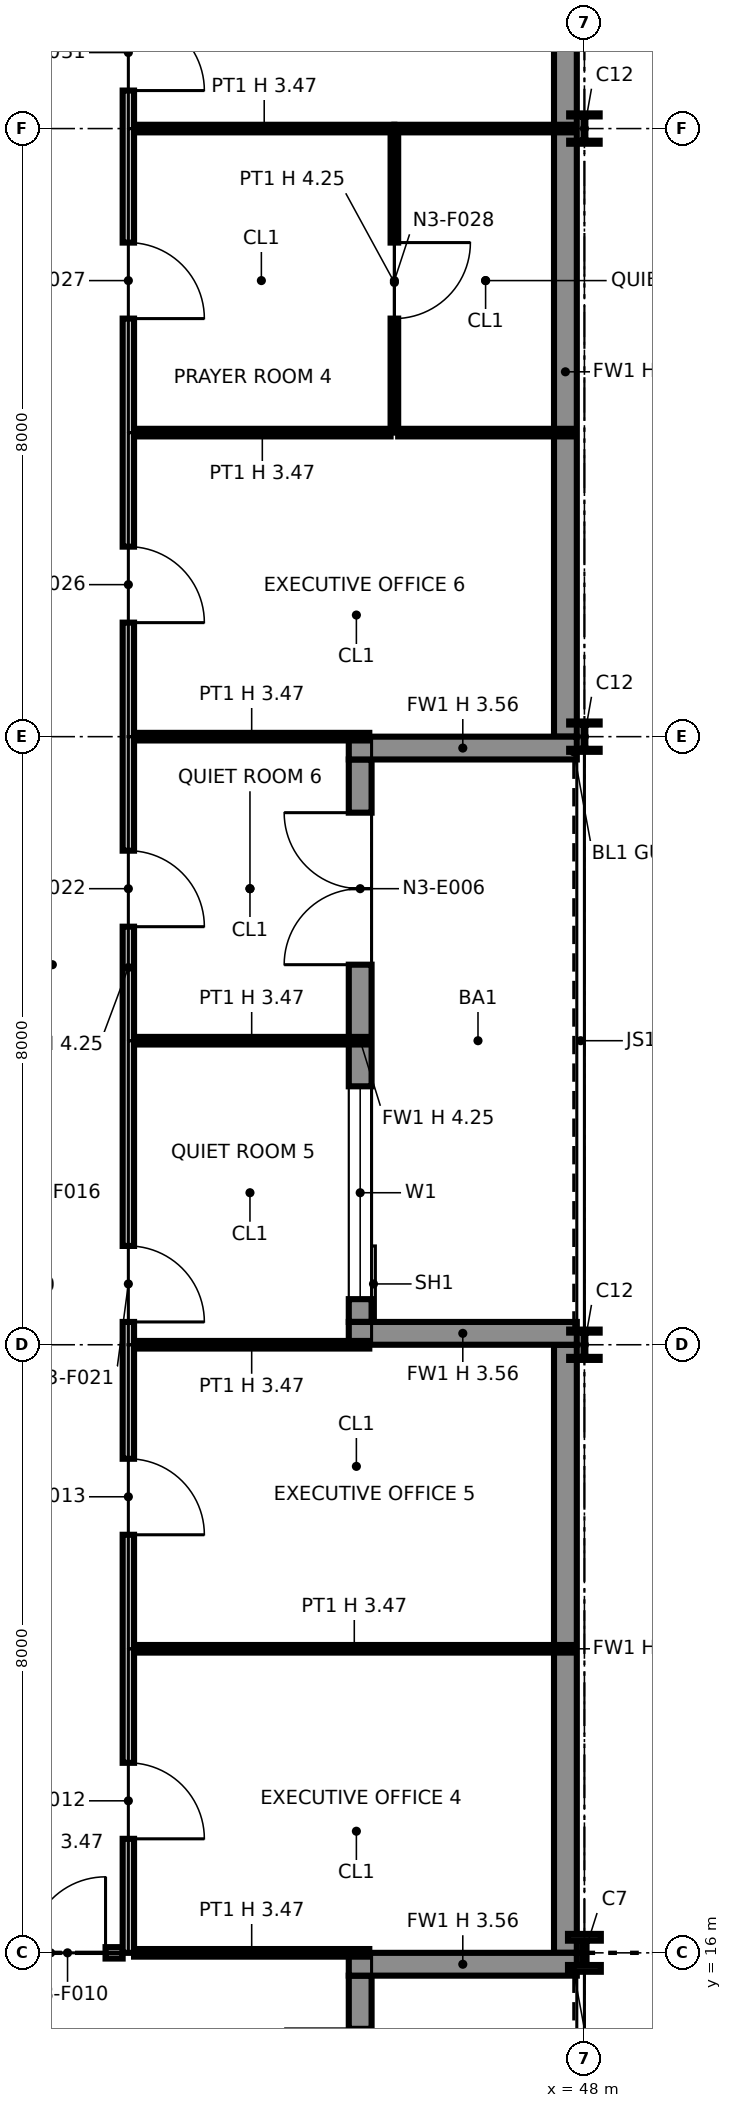
"""IFC4 building model, lengths in metres.
Left out: names, types, materials, properties, quantities, classifications, styles, units other than length and angle.
Written with IfcOpenShell. Run it as: python <this file> out.ifc"""

import sys

from ifc_helpers import new_model, si_unit, direction, frame, frame_2d, origin, origin_2d, place, context, subcontext, project, spatial, polyline, rectangle, i_section, outline, extrude, element, fill, save


model = new_model("IFC4")
c1 = context("Model", 3, precision=1e-05, world=origin(), true_north=direction((0.0, 1.0)))
c2 = subcontext(c1, "Body", "Model", "MODEL_VIEW")
j1 = project(units=[si_unit("LENGTHUNIT", "METRE"), si_unit("PLANEANGLEUNIT", "RADIAN")], contexts=[c1])
p1 = place(None, origin())
s1 = spatial("IfcSite", under=j1, at=p1, CompositionType="ELEMENT")
p2 = place(p1, origin())
s2 = spatial("IfcBuilding", under=s1, at=p2, CompositionType="ELEMENT")
p3 = place(p2, frame((0.0, 0.0, 65.6)))
s3 = spatial("IfcBuildingStorey", under=s2, at=p3, CompositionType="ELEMENT", Elevation=65.6)
p4 = place(p3, frame((48.0, 16.0, 0.0), z_axis=(0.0, 0.0, 1.0), x_axis=(1.0, 0.0, 0.0)))
e1 = element("IfcColumn", 1, at=p4, inside=s3, PredefinedType="COLUMN", context=c2, shape_type="SweptSolid", body=[
    extrude(i_section(OverallWidth=0.432, OverallDepth=0.498, WebThickness=0.056, FlangeThickness=0.089, at=origin_2d()), origin(), (0.0, 0.0, 1.0), 4.25),
])
for number, where, z_axis, x_axis in (
    (2, (48.0, 24.0, 0.0), (0.0, 0.0, 1.0), (1.0, 0.0, 0.0)),
    (3, (48.0, 32.0, 0.0), (0.0, 0.0, 1.0), (1.0, 0.0, 0.0)),
    (4, (48.0, 40.0, 0.0), (0.0, 0.0, 1.0), (1.0, 0.0, 0.0)),
):
    element("IfcColumn", number, at=place(p3, frame(where, z_axis=z_axis, x_axis=x_axis)), inside=s3, PredefinedType="COLUMN", context=c2, shape_type="SweptSolid", body=[
        extrude(i_section(OverallWidth=0.401, OverallDepth=0.399, WebThickness=0.025, FlangeThickness=0.04, at=origin_2d()), origin(), (0.0, 0.0, 1.0), 4.25),
    ])
p5 = place(p3, frame((45.05, 8.3, 0.0), z_axis=(0.0, 0.0, 1.0), x_axis=(0.0, 1.0, 0.0)))
e5 = element("IfcWall", 5, at=p5, inside=s3, PredefinedType="SOLIDWALL", context=c2, shape_type="SweptSolid", body=[
    extrude(rectangle(XDim=7.4, YDim=0.3, at=frame_2d((3.7, 0.0))), origin(), (0.0, 0.0, 1.0), 4.25),
])
p6 = place(p5, frame((0.3, 0.0, 0.9)))
e6 = element("IfcOpeningElement", 6, at=p6, cuts=e5, PredefinedType="OPENING", context=c2, shape_type="SweptSolid", body=[
    extrude(rectangle(XDim=2.8, YDim=2.2, at=frame_2d((1.4, 1.1))), frame((0.0, 0.16, 0.0), z_axis=(0.0, -1.0, 0.0), x_axis=(1.0, 0.0, 0.0)), (0.0, 0.0, 1.0), 0.32),
])
p7 = place(p5, frame((4.7, 0.0, 0.0)))
e7 = element("IfcOpeningElement", 7, at=p7, cuts=e5, PredefinedType="OPENING", context=c2, shape_type="SweptSolid", body=[
    extrude(rectangle(XDim=2.0, YDim=2.4, at=frame_2d((1.0, 1.2))), frame((0.0, 0.16, 0.0), z_axis=(0.0, -1.0, 0.0), x_axis=(1.0, 0.0, 0.0)), (0.0, 0.0, 1.0), 0.32),
])
p8 = place(p3, frame((47.9, 15.85, 0.0), z_axis=(0.0, 0.0, 1.0), x_axis=(-1.0, 0.0, 0.0)))
e8 = element("IfcWall", 8, at=p8, inside=s3, PredefinedType="SOLIDWALL", context=c2, shape_type="SweptSolid", body=[
    extrude(rectangle(XDim=3.0, YDim=0.3, at=frame_2d((1.5, 0.0))), origin(), (0.0, 0.0, 1.0), 3.556),
])
p9 = place(p3, frame((47.75, 16.0, 0.0), z_axis=(0.0, 0.0, 1.0), x_axis=(0.0, 1.0, 0.0)))
e9 = element("IfcWall", 9, at=p9, inside=s3, PredefinedType="SOLIDWALL", context=c2, shape_type="SweptSolid", body=[
    extrude(rectangle(XDim=8.0, YDim=0.3, at=frame_2d((4.0, 0.0))), origin(), (0.0, 0.0, 1.0), 4.25),
])
p10 = place(p3, frame((45.05, 24.3, 0.0), z_axis=(0.0, 0.0, 1.0), x_axis=(0.0, 1.0, 0.0)))
e10 = element("IfcWall", 10, at=p10, inside=s3, PredefinedType="SOLIDWALL", context=c2, shape_type="SweptSolid", body=[
    extrude(rectangle(XDim=7.4, YDim=0.3, at=frame_2d((3.7, 0.0))), origin(), (0.0, 0.0, 1.0), 4.25),
])
p11 = place(p10, frame((0.3, 0.0, 0.9)))
e11 = element("IfcOpeningElement", 11, at=p11, cuts=e10, PredefinedType="OPENING", context=c2, shape_type="SweptSolid", body=[
    extrude(rectangle(XDim=2.8, YDim=2.2, at=frame_2d((1.4, 1.1))), frame((0.0, 0.16, 0.0), z_axis=(0.0, -1.0, 0.0), x_axis=(1.0, 0.0, 0.0)), (0.0, 0.0, 1.0), 0.32),
])
p12 = place(p10, frame((4.7, 0.0, 0.0)))
e12 = element("IfcOpeningElement", 12, at=p12, cuts=e10, PredefinedType="OPENING", context=c2, shape_type="SweptSolid", body=[
    extrude(rectangle(XDim=2.0, YDim=2.4, at=frame_2d((1.0, 1.2))), frame((0.0, 0.16, 0.0), z_axis=(0.0, -1.0, 0.0), x_axis=(1.0, 0.0, 0.0)), (0.0, 0.0, 1.0), 0.32),
])
for number, where, z_axis, x_axis in (
    (13, (47.9, 24.15, 0.0), (0.0, 0.0, 1.0), (-1.0, 0.0, 0.0)),
    (14, (47.9, 31.85, 0.0), (0.0, 0.0, 1.0), (-1.0, 0.0, 0.0)),
):
    element("IfcWall", number, at=place(p3, frame(where, z_axis=z_axis, x_axis=x_axis)), inside=s3, PredefinedType="SOLIDWALL", context=c2, shape_type="SweptSolid", body=[
        extrude(rectangle(XDim=3.0, YDim=0.3, at=frame_2d((1.5, 0.0))), origin(), (0.0, 0.0, 1.0), 3.556),
    ])
p13 = place(p3, frame((47.75, 32.0, 0.0), z_axis=(0.0, 0.0, 1.0), x_axis=(0.0, 1.0, 0.0)))
e15 = element("IfcWall", 15, at=p13, inside=s3, PredefinedType="SOLIDWALL", context=c2, shape_type="SweptSolid", body=[
    extrude(rectangle(XDim=9.6, YDim=0.3, at=frame_2d((4.8, 0.0))), origin(), (0.0, 0.0, 1.0), 4.25),
])
p14 = place(p3, frame((40.03, 16.0, 0.0), z_axis=(0.0, 0.0, 1.0), x_axis=(1.0, 0.0, 0.0)))
e16 = element("IfcWall", 16, at=p14, inside=s3, PredefinedType="PARTITIONING", context=c2, shape_type="SweptSolid", body=[
    extrude(rectangle(XDim=1.895, YDim=0.15, at=frame_2d((0.948, 0.0))), origin(), (0.0, 0.0, 1.0), 3.47),
])
p15 = place(p14, frame((0.67, 0.0, 0.0)))
e17 = element("IfcOpeningElement", 17, at=p15, cuts=e16, PredefinedType="OPENING", context=c2, shape_type="SweptSolid", body=[
    extrude(rectangle(XDim=1.0, YDim=2.1, at=frame_2d((0.5, 1.05))), frame((0.0, 0.085, 0.0), z_axis=(0.0, -1.0, 0.0), x_axis=(1.0, 0.0, 0.0)), (0.0, 0.0, 1.0), 0.17),
])
p16 = place(p3, frame((42.075, 16.0, 0.0), z_axis=(0.0, 0.0, 1.0), x_axis=(1.0, 0.0, 0.0)))
e18 = element("IfcWall", 18, at=p16, inside=s3, PredefinedType="PARTITIONING", context=c2, shape_type="SweptSolid", body=[
    extrude(rectangle(XDim=3.095, YDim=0.1, at=frame_2d((1.547, 0.0))), origin(), (0.0, 0.0, 1.0), 3.47),
])
p17 = place(p3, frame((42.0, 16.0, 0.0), z_axis=(0.0, 0.0, 1.0), x_axis=(0.0, 1.0, 0.0)))
e19 = element("IfcWall", 19, at=p17, inside=s3, PredefinedType="PARTITIONING", context=c2, shape_type="SweptSolid", body=[
    extrude(outline(polyline([(0.0, 0.0), (25.925, 0.0), (25.925, 4.25), (24.3, 4.25), (24.298, 3.47), (23.702, 3.47), (23.7, 4.25), (20.3, 4.25), (20.298, 3.47), (19.702, 3.47), (19.7, 4.25), (16.3, 4.25), (16.298, 3.47), (15.702, 3.47), (15.7, 4.25), (12.3, 4.25), (12.298, 3.47), (11.702, 3.47), (11.7, 4.25), (8.3, 4.25), (8.298, 3.47), (7.702, 3.47), (7.7, 4.25), (4.3, 4.25), (4.298, 3.47), (3.702, 3.47), (3.7, 4.25), (0.0, 4.25), (0.0, 0.0)])), frame((0.0, 0.075, 0.0), z_axis=(0.0, -1.0, 0.0), x_axis=(1.0, 0.0, 0.0)), (0.0, 0.0, 1.0), 0.15),
])
p18 = place(p17, frame((2.5, 0.0, 0.0), z_axis=(0.0, 0.0, 1.0), x_axis=(-1.0, 0.0, 0.0)))
e20 = element("IfcOpeningElement", 20, at=p18, cuts=e19, PredefinedType="OPENING", context=c2, shape_type="SweptSolid", body=[
    extrude(rectangle(XDim=1.0, YDim=2.1, at=frame_2d((0.5, 1.05))), frame((0.0, 0.085, 0.0), z_axis=(0.0, -1.0, 0.0), x_axis=(1.0, 0.0, 0.0)), (0.0, 0.0, 1.0), 0.17),
])
p19 = place(p17, frame((6.5, 0.0, 0.0), z_axis=(0.0, 0.0, 1.0), x_axis=(-1.0, 0.0, 0.0)))
e21 = element("IfcOpeningElement", 21, at=p19, cuts=e19, PredefinedType="OPENING", context=c2, shape_type="SweptSolid", body=[
    extrude(rectangle(XDim=1.0, YDim=2.1, at=frame_2d((0.5, 1.05))), frame((0.0, 0.085, 0.0), z_axis=(0.0, -1.0, 0.0), x_axis=(1.0, 0.0, 0.0)), (0.0, 0.0, 1.0), 0.17),
])
p20 = place(p17, frame((9.3, 0.0, 0.0), z_axis=(0.0, 0.0, 1.0), x_axis=(-1.0, 0.0, 0.0)))
e22 = element("IfcOpeningElement", 22, at=p20, cuts=e19, PredefinedType="OPENING", context=c2, shape_type="SweptSolid", body=[
    extrude(rectangle(XDim=1.0, YDim=2.1, at=frame_2d((0.5, 1.05))), frame((0.0, 0.085, 0.0), z_axis=(0.0, -1.0, 0.0), x_axis=(1.0, 0.0, 0.0)), (0.0, 0.0, 1.0), 0.17),
])
p21 = place(p17, frame((14.5, 0.0, 0.0), z_axis=(0.0, 0.0, 1.0), x_axis=(-1.0, 0.0, 0.0)))
e23 = element("IfcOpeningElement", 23, at=p21, cuts=e19, PredefinedType="OPENING", context=c2, shape_type="SweptSolid", body=[
    extrude(rectangle(XDim=1.0, YDim=2.1, at=frame_2d((0.5, 1.05))), frame((0.0, 0.085, 0.0), z_axis=(0.0, -1.0, 0.0), x_axis=(1.0, 0.0, 0.0)), (0.0, 0.0, 1.0), 0.17),
])
p22 = place(p17, frame((18.5, 0.0, 0.0), z_axis=(0.0, 0.0, 1.0), x_axis=(-1.0, 0.0, 0.0)))
e24 = element("IfcOpeningElement", 24, at=p22, cuts=e19, PredefinedType="OPENING", context=c2, shape_type="SweptSolid", body=[
    extrude(rectangle(XDim=1.0, YDim=2.1, at=frame_2d((0.5, 1.05))), frame((0.0, 0.085, 0.0), z_axis=(0.0, -1.0, 0.0), x_axis=(1.0, 0.0, 0.0)), (0.0, 0.0, 1.0), 0.17),
])
p23 = place(p17, frame((22.5, 0.0, 0.0), z_axis=(0.0, 0.0, 1.0), x_axis=(-1.0, 0.0, 0.0)))
e25 = element("IfcOpeningElement", 25, at=p23, cuts=e19, PredefinedType="OPENING", context=c2, shape_type="SweptSolid", body=[
    extrude(rectangle(XDim=1.0, YDim=2.1, at=frame_2d((0.5, 1.05))), frame((0.0, 0.085, 0.0), z_axis=(0.0, -1.0, 0.0), x_axis=(1.0, 0.0, 0.0)), (0.0, 0.0, 1.0), 0.17),
])
p24 = place(p17, frame((25.5, 0.0, 0.0), z_axis=(0.0, 0.0, 1.0), x_axis=(-1.0, 0.0, 0.0)))
e26 = element("IfcOpeningElement", 26, at=p24, cuts=e19, PredefinedType="OPENING", context=c2, shape_type="SweptSolid", body=[
    extrude(rectangle(XDim=1.0, YDim=2.1, at=frame_2d((0.5, 1.05))), frame((0.0, 0.085, 0.0), z_axis=(0.0, -1.0, 0.0), x_axis=(1.0, 0.0, 0.0)), (0.0, 0.0, 1.0), 0.17),
])
p25 = place(p3, frame((42.075, 20.0, 0.0), z_axis=(0.0, 0.0, 1.0), x_axis=(1.0, 0.0, 0.0)))
e27 = element("IfcWall", 27, at=p25, inside=s3, PredefinedType="PARTITIONING", context=c2, shape_type="SweptSolid", body=[
    extrude(rectangle(XDim=5.795, YDim=0.1, at=frame_2d((2.897, 0.0))), origin(), (0.0, 0.0, 1.0), 3.47),
])
for number, where, z_axis, x_axis in (
    (28, (42.075, 24.0, 0.0), (0.0, 0.0, 1.0), (1.0, 0.0, 0.0)),
    (29, (42.075, 28.0, 0.0), (0.0, 0.0, 1.0), (1.0, 0.0, 0.0)),
    (30, (42.075, 32.0, 0.0), (0.0, 0.0, 1.0), (1.0, 0.0, 0.0)),
):
    element("IfcWall", number, at=place(p3, frame(where, z_axis=z_axis, x_axis=x_axis)), inside=s3, PredefinedType="PARTITIONING", context=c2, shape_type="SweptSolid", body=[
        extrude(rectangle(XDim=3.095, YDim=0.1, at=frame_2d((1.547, 0.0))), origin(), (0.0, 0.0, 1.0), 3.47),
    ])
p26 = place(p3, frame((42.075, 36.0, 0.0), z_axis=(0.0, 0.0, 1.0), x_axis=(1.0, 0.0, 0.0)))
e31 = element("IfcWall", 31, at=p26, inside=s3, PredefinedType="PARTITIONING", context=c2, shape_type="SweptSolid", body=[
    extrude(rectangle(XDim=3.375, YDim=0.1, at=frame_2d((1.688, 0.0))), origin(), (0.0, 0.0, 1.0), 3.47),
])
p27 = place(p3, frame((45.55, 36.0, 0.0), z_axis=(0.0, 0.0, 1.0), x_axis=(1.0, 0.0, 0.0)))
e32 = element("IfcWall", 32, at=p27, inside=s3, PredefinedType="PARTITIONING", context=c2, shape_type="SweptSolid", body=[
    extrude(rectangle(XDim=2.32, YDim=0.1, at=frame_2d((1.16, 0.0))), origin(), (0.0, 0.0, 1.0), 3.47),
])
p28 = place(p3, frame((45.5, 36.0, 0.0), z_axis=(0.0, 0.0, 1.0), x_axis=(0.0, 1.0, 0.0)))
e33 = element("IfcWall", 33, at=p28, inside=s3, PredefinedType="PARTITIONING", context=c2, shape_type="SweptSolid", body=[
    extrude(rectangle(XDim=3.95, YDim=0.1, at=frame_2d((1.975, 0.0))), origin(), (0.0, 0.0, 1.0), 4.25),
])
p29 = place(p28, frame((2.5, 0.0, 0.0), z_axis=(0.0, 0.0, 1.0), x_axis=(-1.0, 0.0, 0.0)))
e34 = element("IfcOpeningElement", 34, at=p29, cuts=e33, PredefinedType="OPENING", context=c2, shape_type="SweptSolid", body=[
    extrude(rectangle(XDim=1.0, YDim=2.1, at=frame_2d((0.5, 1.05))), frame((0.0, 0.06, 0.0), z_axis=(0.0, -1.0, 0.0), x_axis=(1.0, 0.0, 0.0)), (0.0, 0.0, 1.0), 0.12),
])
p30 = place(p3, frame((42.075, 40.0, 0.0), z_axis=(0.0, 0.0, 1.0), x_axis=(1.0, 0.0, 0.0)))
e35 = element("IfcWall", 35, at=p30, inside=s3, PredefinedType="PARTITIONING", context=c2, shape_type="SweptSolid", body=[
    extrude(rectangle(XDim=3.425, YDim=0.1, at=frame_2d((1.712, 0.0))), origin(), (0.0, 0.0, 1.0), 3.47),
])
p31 = place(p3, frame((45.5, 40.0, 0.0), z_axis=(0.0, 0.0, 1.0), x_axis=(1.0, 0.0, 0.0)))
e36 = element("IfcWall", 36, at=p31, inside=s3, PredefinedType="PARTITIONING", context=c2, shape_type="SweptSolid", body=[
    extrude(rectangle(XDim=2.37, YDim=0.1, at=frame_2d((1.185, 0.0))), origin(), (0.0, 0.0, 1.0), 3.47),
])
p32 = place(p11, origin())
e37 = element("IfcWindow", 37, at=p32, inside=s3, PartitioningType="SINGLE_PANEL", PredefinedType="WINDOW", context=c2, shape_type="SweptSolid", body=[
    extrude(rectangle(XDim=2.8, YDim=2.2, at=frame_2d((1.4, 1.1))), frame((0.0, 0.03, 0.0), z_axis=(0.0, -1.0, 0.0), x_axis=(1.0, 0.0, 0.0)), (0.0, 0.0, 1.0), 0.06),
])
fill(e11, e37)
p33 = place(p12, origin())
e38 = element("IfcDoor", 38, at=p33, inside=s3, OperationType="DOUBLE_DOOR_SINGLE_SWING", PredefinedType="DOOR", context=c2, shape_type="SweptSolid", body=[
    extrude(rectangle(XDim=2.0, YDim=2.4, at=frame_2d((1.0, 1.2))), frame((0.0, 0.025, 0.0), z_axis=(0.0, -1.0, 0.0), x_axis=(1.0, 0.0, 0.0)), (0.0, 0.0, 1.0), 0.05),
])
fill(e12, e38)
p34 = place(p15, origin())
e39 = element("IfcDoor", 39, at=p34, inside=s3, OperationType="SINGLE_SWING_RIGHT", PredefinedType="DOOR", context=c2, shape_type="SweptSolid", body=[
    extrude(rectangle(XDim=1.0, YDim=2.1, at=frame_2d((0.5, 1.05))), frame((0.0, 0.025, 0.0), z_axis=(0.0, -1.0, 0.0), x_axis=(1.0, 0.0, 0.0)), (0.0, 0.0, 1.0), 0.05),
])
fill(e17, e39)
p35 = place(p18, origin())
e40 = element("IfcDoor", 40, at=p35, inside=s3, OperationType="SINGLE_SWING_RIGHT", PredefinedType="DOOR", context=c2, shape_type="SweptSolid", body=[
    extrude(rectangle(XDim=1.0, YDim=2.1, at=frame_2d((0.5, 1.05))), frame((0.0, 0.025, 0.0), z_axis=(0.0, -1.0, 0.0), x_axis=(1.0, 0.0, 0.0)), (0.0, 0.0, 1.0), 0.05),
])
fill(e20, e40)
p36 = place(p19, origin())
e41 = element("IfcDoor", 41, at=p36, inside=s3, OperationType="SINGLE_SWING_RIGHT", PredefinedType="DOOR", context=c2, shape_type="SweptSolid", body=[
    extrude(rectangle(XDim=1.0, YDim=2.1, at=frame_2d((0.5, 1.05))), frame((0.0, 0.025, 0.0), z_axis=(0.0, -1.0, 0.0), x_axis=(1.0, 0.0, 0.0)), (0.0, 0.0, 1.0), 0.05),
])
fill(e21, e41)
p37 = place(p20, origin())
e42 = element("IfcDoor", 42, at=p37, inside=s3, OperationType="SINGLE_SWING_RIGHT", PredefinedType="DOOR", context=c2, shape_type="SweptSolid", body=[
    extrude(rectangle(XDim=1.0, YDim=2.1, at=frame_2d((0.5, 1.05))), frame((0.0, 0.025, 0.0), z_axis=(0.0, -1.0, 0.0), x_axis=(1.0, 0.0, 0.0)), (0.0, 0.0, 1.0), 0.05),
])
fill(e22, e42)
p38 = place(p21, origin())
e43 = element("IfcDoor", 43, at=p38, inside=s3, OperationType="SINGLE_SWING_RIGHT", PredefinedType="DOOR", context=c2, shape_type="SweptSolid", body=[
    extrude(rectangle(XDim=1.0, YDim=2.1, at=frame_2d((0.5, 1.05))), frame((0.0, 0.025, 0.0), z_axis=(0.0, -1.0, 0.0), x_axis=(1.0, 0.0, 0.0)), (0.0, 0.0, 1.0), 0.05),
])
fill(e23, e43)
p39 = place(p22, origin())
e44 = element("IfcDoor", 44, at=p39, inside=s3, OperationType="SINGLE_SWING_RIGHT", PredefinedType="DOOR", context=c2, shape_type="SweptSolid", body=[
    extrude(rectangle(XDim=1.0, YDim=2.1, at=frame_2d((0.5, 1.05))), frame((0.0, 0.025, 0.0), z_axis=(0.0, -1.0, 0.0), x_axis=(1.0, 0.0, 0.0)), (0.0, 0.0, 1.0), 0.05),
])
fill(e24, e44)
p40 = place(p23, origin())
e45 = element("IfcDoor", 45, at=p40, inside=s3, OperationType="SINGLE_SWING_RIGHT", PredefinedType="DOOR", context=c2, shape_type="SweptSolid", body=[
    extrude(rectangle(XDim=1.0, YDim=2.1, at=frame_2d((0.5, 1.05))), frame((0.0, 0.025, 0.0), z_axis=(0.0, -1.0, 0.0), x_axis=(1.0, 0.0, 0.0)), (0.0, 0.0, 1.0), 0.05),
])
fill(e25, e45)
p41 = place(p29, origin())
e46 = element("IfcDoor", 46, at=p41, inside=s3, OperationType="SINGLE_SWING_LEFT", PredefinedType="DOOR", context=c2, shape_type="SweptSolid", body=[
    extrude(rectangle(XDim=1.0, YDim=2.1, at=frame_2d((0.5, 1.05))), frame((0.0, 0.025, 0.0), z_axis=(0.0, -1.0, 0.0), x_axis=(1.0, 0.0, 0.0)), (0.0, 0.0, 1.0), 0.05),
])
fill(e34, e46)
p42 = place(p24, origin())
e47 = element("IfcDoor", 47, at=p42, inside=s3, OperationType="SINGLE_SWING_RIGHT", PredefinedType="DOOR", context=c2, shape_type="SweptSolid", body=[
    extrude(rectangle(XDim=1.0, YDim=2.1, at=frame_2d((0.5, 1.05))), frame((0.0, 0.025, 0.0), z_axis=(0.0, -1.0, 0.0), x_axis=(1.0, 0.0, 0.0)), (0.0, 0.0, 1.0), 0.05),
])
fill(e26, e47)
save(model, sys.argv[1])
